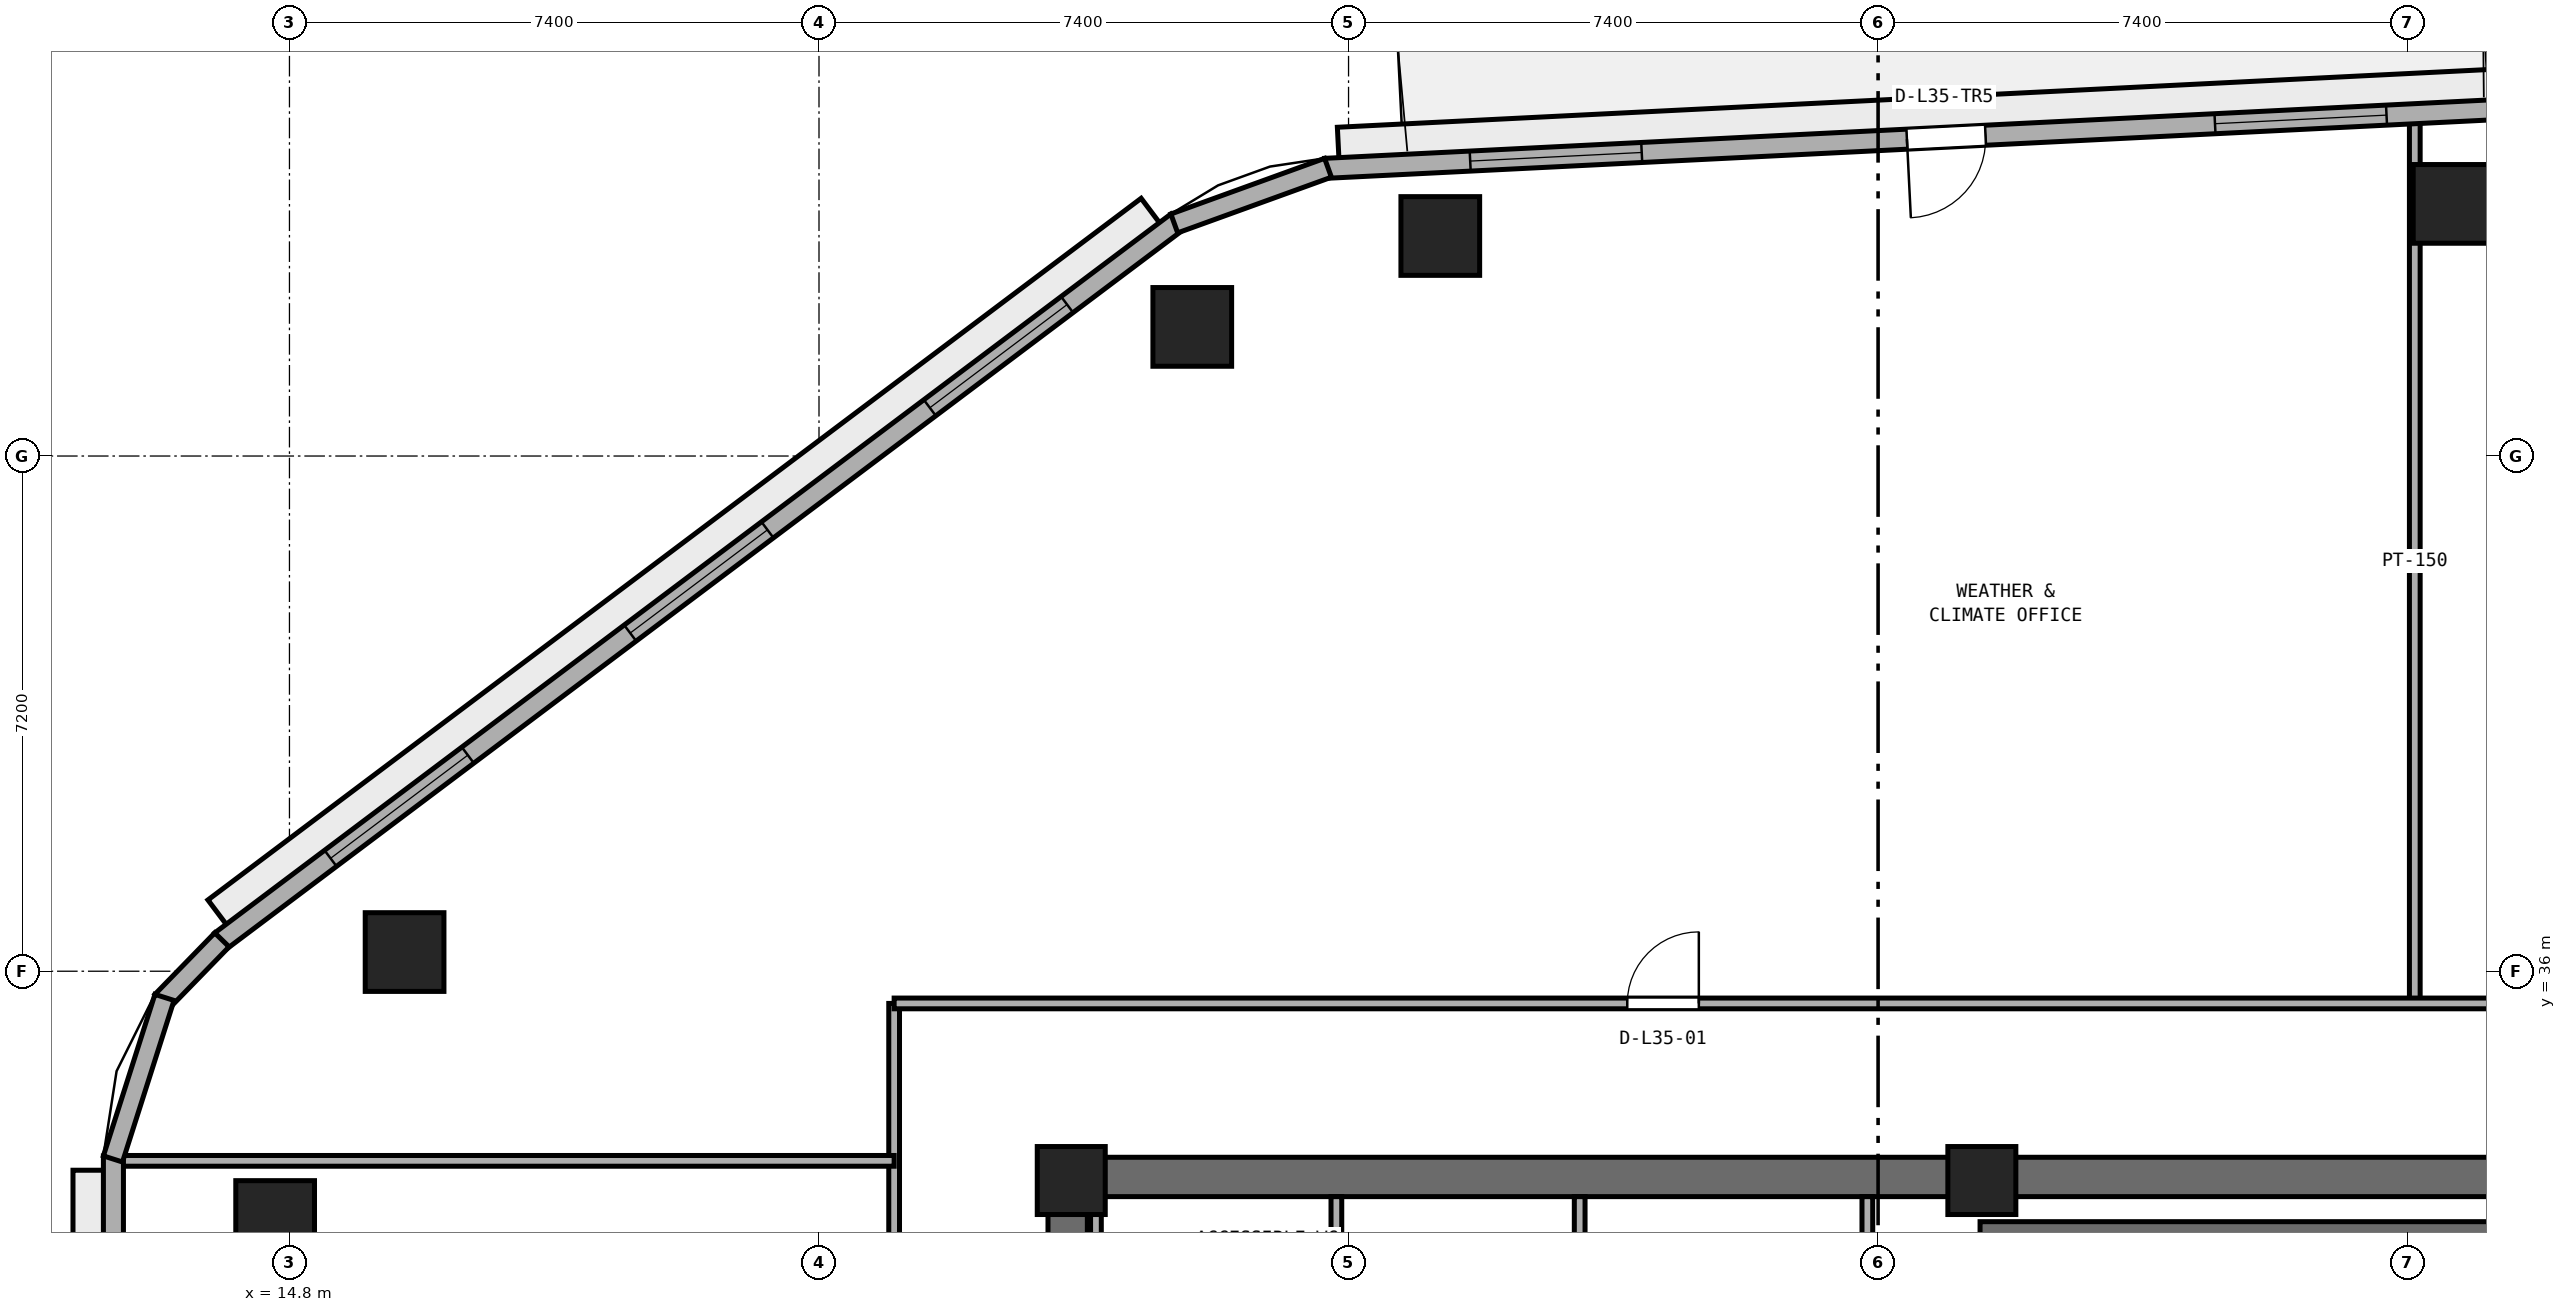
"""IFC4 building model, lengths in metres.
Left out: names, types, materials, properties, quantities, classifications, styles, units other than length and angle.
Written with IfcOpenShell. Run it as: python <this file> out.ifc"""

import sys

from ifc_helpers import new_model, si_unit, direction, frame, frame_2d, origin, origin_2d, place, context, subcontext, project, spatial, rectangle, extrude, element, fill, save


model = new_model("IFC4")
c1 = context("Model", 3, precision=1e-05, world=origin(), true_north=direction((0.0, 1.0)))
c2 = subcontext(c1, "Body", "Model", "MODEL_VIEW")
j1 = project(units=[si_unit("LENGTHUNIT", "METRE"), si_unit("PLANEANGLEUNIT", "RADIAN")], contexts=[c1])
p1 = place(None, origin())
s1 = spatial("IfcSite", under=j1, at=p1, CompositionType="ELEMENT")
p2 = place(p1, origin())
s2 = spatial("IfcBuilding", under=s1, at=p2, CompositionType="ELEMENT")
p3 = place(p2, frame((0.0, 0.0, 140.2)))
s3 = spatial("IfcBuildingStorey", under=s2, at=p3, CompositionType="ELEMENT", Elevation=140.2)
p4 = place(p3, frame((25.4, 33.125, 0.0), z_axis=(0.0, 0.0, 1.0), x_axis=(1.0, 0.0, 0.0)))
e1 = element("IfcWall", 1, at=p4, inside=s3, PredefinedType="SHEAR", context=c2, shape_type="SweptSolid", body=[
    extrude(rectangle(XDim=23.2, YDim=0.55, at=frame_2d((11.6, 0.0))), origin(), (0.0, 0.0, 1.0), 3.54),
])
p5 = place(p3, frame((25.675, 17.55, 0.0), z_axis=(0.0, 0.0, 1.0), x_axis=(0.0, 1.0, 0.0)))
e2 = element("IfcWall", 2, at=p5, inside=s3, PredefinedType="SHEAR", context=c2, shape_type="SweptSolid", body=[
    extrude(rectangle(XDim=15.3, YDim=0.55, at=frame_2d((7.65, 0.0))), origin(), (0.0, 0.0, 1.0), 3.54),
])
p6 = place(p5, frame((6.9, 0.0, 0.0)))
e3 = element("IfcOpeningElement", 3, at=p6, cuts=e2, PredefinedType="OPENING", context=c2, shape_type="SweptSolid", body=[
    extrude(rectangle(XDim=1.5, YDim=2.15, at=frame_2d((0.75, 1.075))), frame((0.0, 0.285, 0.0), z_axis=(0.0, -1.0, 0.0), x_axis=(1.0, 0.0, 0.0)), (0.0, 0.0, 1.0), 0.57),
])
for number, where, z_axis, x_axis in (
    (4, (38.45, 33.075, 0.0), (0.0, 0.0, 1.0), (1.0, 0.0, 0.0)),
    (5, (25.725, 33.075, 0.0), (0.0, 0.0, 1.0), (1.0, 0.0, 0.0)),
):
    element("IfcColumn", number, at=place(p3, frame(where, z_axis=z_axis, x_axis=x_axis)), inside=s3, PredefinedType="PILASTER", context=c2, shape_type="SweptSolid", body=[
        extrude(rectangle(XDim=0.95, YDim=0.95, at=origin_2d()), origin(), (0.0, 0.0, 1.0), 3.8),
    ])
for number, where, z_axis, x_axis in (
    (6, (45.028, 46.724, 0.0), (0.0, 0.0, 1.0), (1.0, 0.0, 0.0)),
    (7, (30.882, 46.275, 0.0), (0.0, 0.0, 1.0), (1.0, 0.0, 0.0)),
    (8, (27.416, 45.004, 0.0), (0.0, 0.0, 1.0), (1.0, 0.0, 0.0)),
    (9, (16.409, 36.268, 0.0), (0.0, 0.0, 1.0), (1.0, 0.0, 0.0)),
    (10, (14.6, 32.523, 0.0), (0.0, 0.0, 1.0), (1.0, 0.0, 0.0)),
):
    element("IfcColumn", number, at=place(p3, frame(where, z_axis=z_axis, x_axis=x_axis)), inside=s3, PredefinedType="COLUMN", context=c2, shape_type="SweptSolid", body=[
        extrude(rectangle(XDim=1.1, YDim=1.1, at=origin_2d()), origin(), (0.0, 0.0, 1.0), 3.8),
    ])
p7 = place(p3, frame((38.425, 32.375, 0.0), z_axis=(0.0, 0.0, 1.0), x_axis=(1.0, 0.0, 0.0)))
e11 = element("IfcWall", 11, at=p7, inside=s3, PredefinedType="SHEAR", context=c2, shape_type="SweptSolid", body=[
    extrude(rectangle(XDim=7.3, YDim=0.25, at=frame_2d((3.65, 0.0))), origin(), (0.0, 0.0, 1.0), 3.54),
])
p8 = place(p3, frame((26.07, 30.65, 0.0), z_axis=(0.0, 0.0, 1.0), x_axis=(0.0, 1.0, 0.0)))
e12 = element("IfcWall", 12, at=p8, inside=s3, PredefinedType="PARTITIONING", context=c2, shape_type="SweptSolid", body=[
    extrude(rectangle(XDim=2.2, YDim=0.15, at=frame_2d((1.1, 0.0))), origin(), (0.0, 0.0, 1.0), 2.64),
])
for number, where, z_axis, x_axis in (
    (13, (29.43, 30.65, 0.0), (0.0, 0.0, 1.0), (0.0, 1.0, 0.0)),
    (14, (32.83, 30.65, 0.0), (0.0, 0.0, 1.0), (0.0, 1.0, 0.0)),
    (15, (36.85, 30.65, 0.0), (0.0, 0.0, 1.0), (0.0, 1.0, 0.0)),
):
    element("IfcWall", number, at=place(p3, frame(where, z_axis=z_axis, x_axis=x_axis)), inside=s3, PredefinedType="PARTITIONING", context=c2, shape_type="SweptSolid", body=[
        extrude(rectangle(XDim=2.2, YDim=0.15, at=frame_2d((1.1, 0.0))), origin(), (0.0, 0.0, 1.0), 3.54),
    ])
p9 = place(p3, frame((44.5, 35.55, 0.0), z_axis=(0.0, 0.0, 1.0), x_axis=(0.0, 1.0, 0.0)))
e16 = element("IfcWall", 16, at=p9, inside=s3, PredefinedType="PARTITIONING", context=c2, shape_type="SweptSolid", body=[
    extrude(rectangle(XDim=12.369, YDim=0.15, at=frame_2d((6.185, 0.0))), origin(), (0.0, 0.0, 1.0), 3.54),
])
p10 = place(p3, frame((23.25, 26.55, 0.0), z_axis=(0.0, 0.0, 1.0), x_axis=(0.0, 1.0, 0.0)))
e17 = element("IfcWall", 17, at=p10, inside=s3, PredefinedType="PARTITIONING", context=c2, shape_type="SweptSolid", body=[
    extrude(rectangle(XDim=9.0, YDim=0.15, at=frame_2d((4.5, 0.0))), origin(), (0.0, 0.0, 1.0), 3.54),
])
p11 = place(p3, frame((12.405, 33.35, 0.0), z_axis=(0.0, 0.0, 1.0), x_axis=(1.0, 0.0, 0.0)))
e18 = element("IfcWall", 18, at=p11, inside=s3, PredefinedType="PARTITIONING", context=c2, shape_type="SweptSolid", body=[
    extrude(rectangle(XDim=10.845, YDim=0.15, at=frame_2d((5.422, 0.0))), origin(), (0.0, 0.0, 1.0), 3.54),
])
p12 = place(p3, frame((23.25, 35.55, 0.0), z_axis=(0.0, 0.0, 1.0), x_axis=(1.0, 0.0, 0.0)))
e19 = element("IfcWall", 19, at=p12, inside=s3, PredefinedType="PARTITIONING", context=c2, shape_type="SweptSolid", body=[
    extrude(rectangle(XDim=27.5, YDim=0.15, at=frame_2d((13.75, 0.0))), origin(), (0.0, 0.0, 1.0), 3.54),
])
p13 = place(p12, frame((10.245, 0.0, 0.0)))
e20 = element("IfcOpeningElement", 20, at=p13, cuts=e19, PredefinedType="OPENING", context=c2, shape_type="SweptSolid", body=[
    extrude(rectangle(XDim=1.0, YDim=2.12, at=frame_2d((0.5, 1.06))), frame((0.0, 0.085, 0.0), z_axis=(0.0, -1.0, 0.0), x_axis=(1.0, 0.0, 0.0)), (0.0, 0.0, 1.0), 0.17),
])
p14 = place(p12, frame((23.755, 0.0, 0.0)))
e21 = element("IfcOpeningElement", 21, at=p14, cuts=e19, PredefinedType="OPENING", context=c2, shape_type="SweptSolid", body=[
    extrude(rectangle(XDim=1.0, YDim=2.12, at=frame_2d((0.5, 1.06))), frame((0.0, 0.085, 0.0), z_axis=(0.0, -1.0, 0.0), x_axis=(1.0, 0.0, 0.0)), (0.0, 0.0, 1.0), 0.17),
])
p15 = place(p3, frame((46.632, 48.091, 0.0), z_axis=(0.0, 0.0, 1.0), x_axis=(-0.998744129094, -0.050101542886, 0.0)))
e22 = element("IfcWall", 22, at=p15, inside=s3, PredefinedType="STANDARD", context=c2, shape_type="SweptSolid", body=[
    extrude(rectangle(XDim=17.382, YDim=0.28, at=frame_2d((8.691, 0.0))), origin(), (0.0, 0.0, 1.0), 3.54),
])
p16 = place(p15, frame((8.141, 0.0, 0.0)))
e23 = element("IfcOpeningElement", 23, at=p16, cuts=e22, PredefinedType="OPENING", context=c2, shape_type="SweptSolid", body=[
    extrude(rectangle(XDim=1.1, YDim=2.2, at=frame_2d((0.55, 1.1))), frame((0.0, 0.15, 0.0), z_axis=(0.0, -1.0, 0.0), x_axis=(1.0, 0.0, 0.0)), (0.0, 0.0, 1.0), 0.3),
])
p17 = place(p15, frame((2.53, 0.0, 0.9)))
e24 = element("IfcOpeningElement", 24, at=p17, cuts=e22, PredefinedType="OPENING", context=c2, shape_type="SweptSolid", body=[
    extrude(rectangle(XDim=2.4, YDim=1.75, at=frame_2d((1.2, 0.875))), frame((0.0, 0.15, 0.0), z_axis=(0.0, -1.0, 0.0), x_axis=(1.0, 0.0, 0.0)), (0.0, 0.0, 1.0), 0.3),
])
p18 = place(p15, frame((12.951, 0.0, 0.9)))
e25 = element("IfcOpeningElement", 25, at=p18, cuts=e22, PredefinedType="OPENING", context=c2, shape_type="SweptSolid", body=[
    extrude(rectangle(XDim=2.4, YDim=1.75, at=frame_2d((1.2, 0.875))), frame((0.0, 0.15, 0.0), z_axis=(0.0, -1.0, 0.0), x_axis=(1.0, 0.0, 0.0)), (0.0, 0.0, 1.0), 0.3),
])
p19 = place(p3, frame((27.201, 46.47, 0.0), z_axis=(0.0, 0.0, 1.0), x_axis=(-0.799280853427, -0.600957666849, 0.0)))
e26 = element("IfcWall", 26, at=p19, inside=s3, PredefinedType="STANDARD", context=c2, shape_type="SweptSolid", body=[
    extrude(rectangle(XDim=16.716, YDim=0.28, at=frame_2d((8.358, 0.0))), origin(), (0.0, 0.0, 1.0), 3.54),
])
p20 = place(p19, frame((1.919, 0.0, 0.9)))
e27 = element("IfcOpeningElement", 27, at=p20, cuts=e26, PredefinedType="OPENING", context=c2, shape_type="SweptSolid", body=[
    extrude(rectangle(XDim=2.4, YDim=1.75, at=frame_2d((1.2, 0.875))), frame((0.0, 0.15, 0.0), z_axis=(0.0, -1.0, 0.0), x_axis=(1.0, 0.0, 0.0)), (0.0, 0.0, 1.0), 0.3),
])
p21 = place(p19, frame((7.158, 0.0, 0.9)))
e28 = element("IfcOpeningElement", 28, at=p21, cuts=e26, PredefinedType="OPENING", context=c2, shape_type="SweptSolid", body=[
    extrude(rectangle(XDim=2.4, YDim=1.75, at=frame_2d((1.2, 0.875))), frame((0.0, 0.15, 0.0), z_axis=(0.0, -1.0, 0.0), x_axis=(1.0, 0.0, 0.0)), (0.0, 0.0, 1.0), 0.3),
])
p22 = place(p19, frame((12.397, 0.0, 0.9)))
e29 = element("IfcOpeningElement", 29, at=p22, cuts=e26, PredefinedType="OPENING", context=c2, shape_type="SweptSolid", body=[
    extrude(rectangle(XDim=2.4, YDim=1.75, at=frame_2d((1.2, 0.875))), frame((0.0, 0.15, 0.0), z_axis=(0.0, -1.0, 0.0), x_axis=(1.0, 0.0, 0.0)), (0.0, 0.0, 1.0), 0.3),
])
p23 = place(p3, frame((12.34, 33.419, 0.0), z_axis=(0.0, 0.0, 1.0), x_axis=(0.0, -1.0, 0.0)))
e30 = element("IfcWall", 30, at=p23, inside=s3, PredefinedType="STANDARD", context=c2, shape_type="SweptSolid", body=[
    extrude(rectangle(XDim=17.232, YDim=0.28, at=frame_2d((8.616, 0.0))), origin(), (0.0, 0.0, 1.0), 3.54),
])
p24 = place(p23, frame((8.066, 0.0, 0.0)))
e31 = element("IfcOpeningElement", 31, at=p24, cuts=e30, PredefinedType="OPENING", context=c2, shape_type="SweptSolid", body=[
    extrude(rectangle(XDim=1.1, YDim=2.2, at=frame_2d((0.55, 1.1))), frame((0.0, 0.15, 0.0), z_axis=(0.0, -1.0, 0.0), x_axis=(1.0, 0.0, 0.0)), (0.0, 0.0, 1.0), 0.3),
])
p25 = place(p23, frame((2.005, 0.0, 0.9)))
e32 = element("IfcOpeningElement", 32, at=p25, cuts=e30, PredefinedType="OPENING", context=c2, shape_type="SweptSolid", body=[
    extrude(rectangle(XDim=2.4, YDim=1.75, at=frame_2d((1.2, 0.875))), frame((0.0, 0.15, 0.0), z_axis=(0.0, -1.0, 0.0), x_axis=(1.0, 0.0, 0.0)), (0.0, 0.0, 1.0), 0.3),
])
p26 = place(p23, frame((12.827, 0.0, 0.9)))
e33 = element("IfcOpeningElement", 33, at=p26, cuts=e30, PredefinedType="OPENING", context=c2, shape_type="SweptSolid", body=[
    extrude(rectangle(XDim=2.4, YDim=1.75, at=frame_2d((1.2, 0.875))), frame((0.0, 0.15, 0.0), z_axis=(0.0, -1.0, 0.0), x_axis=(1.0, 0.0, 0.0)), (0.0, 0.0, 1.0), 0.3),
])
p27 = place(p3, frame((29.313, 47.228, 0.0), z_axis=(0.0, 0.0, 1.0), x_axis=(-0.940226330758, -0.340550212084, 0.0)))
e34 = element("IfcWall", 34, at=p27, inside=s3, PredefinedType="STANDARD", context=c2, shape_type="SweptSolid", body=[
    extrude(rectangle(XDim=2.285, YDim=0.28, at=frame_2d((1.142, 0.0))), origin(), (0.0, 0.0, 1.0), 3.54),
])
p28 = place(p3, frame((13.856, 36.438, 0.0), z_axis=(0.0, 0.0, 1.0), x_axis=(-0.697369094044, -0.716712178404, 0.0)))
e35 = element("IfcWall", 35, at=p28, inside=s3, PredefinedType="STANDARD", context=c2, shape_type="SweptSolid", body=[
    extrude(rectangle(XDim=1.199, YDim=0.28, at=frame_2d((0.6, 0.0))), origin(), (0.0, 0.0, 1.0), 3.54),
])
p29 = place(p3, frame((13.053, 35.634, 0.0), z_axis=(0.0, 0.0, 1.0), x_axis=(-0.303807416298, -0.952733464198, 0.0)))
e36 = element("IfcWall", 36, at=p29, inside=s3, PredefinedType="STANDARD", context=c2, shape_type="SweptSolid", body=[
    extrude(rectangle(XDim=2.37, YDim=0.28, at=frame_2d((1.185, 0.0))), origin(), (0.0, 0.0, 1.0), 3.54),
])
p30 = place(p13, origin())
e37 = element("IfcDoor", 37, at=p30, inside=s3, OperationType="SINGLE_SWING_RIGHT", PredefinedType="DOOR", context=c2, shape_type="SweptSolid", body=[
    extrude(rectangle(XDim=1.0, YDim=2.12, at=frame_2d((0.5, 1.06))), frame((0.0, 0.025, 0.0), z_axis=(0.0, -1.0, 0.0), x_axis=(1.0, 0.0, 0.0)), (0.0, 0.0, 1.0), 0.05),
])
fill(e20, e37)
p31 = place(p16, origin())
e38 = element("IfcDoor", 38, at=p31, inside=s3, OperationType="SINGLE_SWING_RIGHT", PredefinedType="DOOR", context=c2, shape_type="SweptSolid", body=[
    extrude(rectangle(XDim=1.1, YDim=2.2, at=frame_2d((0.55, 1.1))), frame((0.0, 0.025, 0.0), z_axis=(0.0, -1.0, 0.0), x_axis=(1.0, 0.0, 0.0)), (0.0, 0.0, 1.0), 0.05),
])
fill(e23, e38)
p32 = place(p17, origin())
e39 = element("IfcWindow", 39, at=p32, inside=s3, PartitioningType="SINGLE_PANEL", PredefinedType="WINDOW", context=c2, shape_type="SweptSolid", body=[
    extrude(rectangle(XDim=2.4, YDim=1.75, at=frame_2d((1.2, 0.875))), frame((0.0, 0.03, 0.0), z_axis=(0.0, -1.0, 0.0), x_axis=(1.0, 0.0, 0.0)), (0.0, 0.0, 1.0), 0.06),
])
fill(e24, e39)
p33 = place(p18, origin())
e40 = element("IfcWindow", 40, at=p33, inside=s3, PartitioningType="SINGLE_PANEL", PredefinedType="WINDOW", context=c2, shape_type="SweptSolid", body=[
    extrude(rectangle(XDim=2.4, YDim=1.75, at=frame_2d((1.2, 0.875))), frame((0.0, 0.03, 0.0), z_axis=(0.0, -1.0, 0.0), x_axis=(1.0, 0.0, 0.0)), (0.0, 0.0, 1.0), 0.06),
])
fill(e25, e40)
p34 = place(p20, origin())
e41 = element("IfcWindow", 41, at=p34, inside=s3, PartitioningType="SINGLE_PANEL", PredefinedType="WINDOW", context=c2, shape_type="SweptSolid", body=[
    extrude(rectangle(XDim=2.4, YDim=1.75, at=frame_2d((1.2, 0.875))), frame((0.0, 0.03, 0.0), z_axis=(0.0, -1.0, 0.0), x_axis=(1.0, 0.0, 0.0)), (0.0, 0.0, 1.0), 0.06),
])
fill(e27, e41)
p35 = place(p21, origin())
e42 = element("IfcWindow", 42, at=p35, inside=s3, PartitioningType="SINGLE_PANEL", PredefinedType="WINDOW", context=c2, shape_type="SweptSolid", body=[
    extrude(rectangle(XDim=2.4, YDim=1.75, at=frame_2d((1.2, 0.875))), frame((0.0, 0.03, 0.0), z_axis=(0.0, -1.0, 0.0), x_axis=(1.0, 0.0, 0.0)), (0.0, 0.0, 1.0), 0.06),
])
fill(e28, e42)
p36 = place(p22, origin())
e43 = element("IfcWindow", 43, at=p36, inside=s3, PartitioningType="SINGLE_PANEL", PredefinedType="WINDOW", context=c2, shape_type="SweptSolid", body=[
    extrude(rectangle(XDim=2.4, YDim=1.75, at=frame_2d((1.2, 0.875))), frame((0.0, 0.03, 0.0), z_axis=(0.0, -1.0, 0.0), x_axis=(1.0, 0.0, 0.0)), (0.0, 0.0, 1.0), 0.06),
])
fill(e29, e43)
save(model, sys.argv[1])
